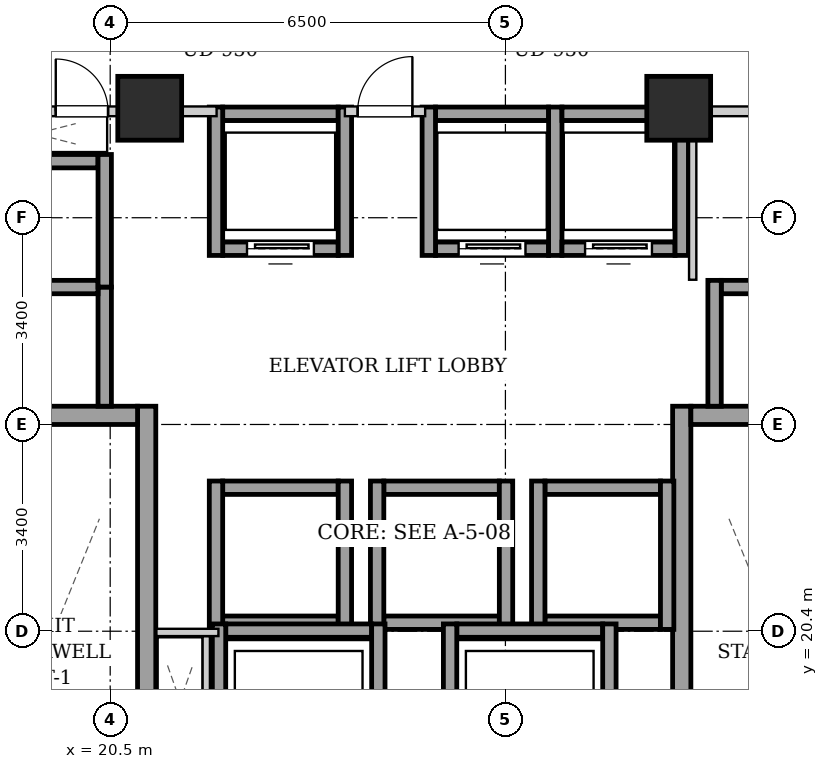
"""IFC4 building model, lengths in metres.
Left out: names, types, materials, properties, quantities, classifications, styles, units other than length and angle.
Written with IfcOpenShell. Run it as: python <this file> out.ifc"""

import sys

from ifc_helpers import new_model, si_unit, direction, frame, frame_2d, origin, origin_2d, place, context, subcontext, project, spatial, rectangle, extrude, element, fill, save


model = new_model("IFC4")
c1 = context("Model", 3, precision=1e-05, world=origin(), true_north=direction((0.0, 1.0)))
c2 = subcontext(c1, "Body", "Model", "MODEL_VIEW")
j1 = project(units=[si_unit("LENGTHUNIT", "METRE"), si_unit("PLANEANGLEUNIT", "RADIAN")], contexts=[c1])
p1 = place(None, origin())
s1 = spatial("IfcSite", under=j1, at=p1, CompositionType="ELEMENT")
p2 = place(p1, origin())
s2 = spatial("IfcBuilding", under=s1, at=p2, CompositionType="ELEMENT")
p3 = place(p2, frame((0.0, 0.0, 103.9)))
s3 = spatial("IfcBuildingStorey", under=s2, at=p3, CompositionType="ELEMENT", Elevation=103.9)
for number, where, z_axis, x_axis in (
    (1, (21.15, 29.0, 0.0), (0.0, 0.0, 1.0), (1.0, 0.0, 0.0)),
    (2, (29.85, 29.0, 0.0), (0.0, 0.0, 1.0), (1.0, 0.0, 0.0)),
):
    element("IfcColumn", number, at=place(p3, frame(where, z_axis=z_axis, x_axis=x_axis)), inside=s3, PredefinedType="COLUMN", context=c2, shape_type="SweptSolid", body=[
        extrude(rectangle(XDim=1.05, YDim=1.05, at=origin_2d()), origin(), (0.0, 0.0, 1.0), 3.2),
    ])
p4 = place(p3, frame((21.1, 15.1, 0.0), z_axis=(0.0, 0.0, 1.0), x_axis=(0.0, 1.0, 0.0)))
e3 = element("IfcWall", 3, at=p4, inside=s3, PredefinedType="SHEAR", context=c2, shape_type="SweptSolid", body=[
    extrude(rectangle(XDim=9.0, YDim=0.3, at=frame_2d((4.5, 0.0))), origin(), (0.0, 0.0, 1.0), 2.94),
])
p5 = place(p3, frame((18.1, 23.95, 0.0), z_axis=(0.0, 0.0, 1.0), x_axis=(1.0, 0.0, 0.0)))
e4 = element("IfcWall", 4, at=p5, inside=s3, PredefinedType="SHEAR", context=c2, shape_type="SweptSolid", body=[
    extrude(rectangle(XDim=2.85, YDim=0.3, at=frame_2d((1.425, 0.0))), origin(), (0.0, 0.0, 1.0), 2.94),
])
p6 = place(p3, frame((29.9, 15.1, 0.0), z_axis=(0.0, 0.0, 1.0), x_axis=(0.0, 1.0, 0.0)))
e5 = element("IfcWall", 5, at=p6, inside=s3, PredefinedType="SHEAR", context=c2, shape_type="SweptSolid", body=[
    extrude(rectangle(XDim=9.0, YDim=0.3, at=frame_2d((4.5, 0.0))), origin(), (0.0, 0.0, 1.0), 2.94),
])
p7 = place(p3, frame((30.05, 23.95, 0.0), z_axis=(0.0, 0.0, 1.0), x_axis=(1.0, 0.0, 0.0)))
e6 = element("IfcWall", 6, at=p7, inside=s3, PredefinedType="SHEAR", context=c2, shape_type="SweptSolid", body=[
    extrude(rectangle(XDim=2.85, YDim=0.3, at=frame_2d((1.425, 0.0))), origin(), (0.0, 0.0, 1.0), 2.94),
])
p8 = place(p3, frame((22.35, 26.69, 0.0), z_axis=(0.0, 0.0, 1.0), x_axis=(1.0, 0.0, 0.0)))
e7 = element("IfcWall", 7, at=p8, inside=s3, PredefinedType="SHEAR", context=c2, shape_type="SweptSolid", body=[
    extrude(rectangle(XDim=1.9, YDim=0.22, at=frame_2d((0.95, 0.0))), origin(), (0.0, 0.0, 1.0), 2.94),
])
p9 = place(p8, frame((0.4, 0.0, 0.0)))
e8 = element("IfcOpeningElement", 8, at=p9, cuts=e7, PredefinedType="OPENING", context=c2, shape_type="SweptSolid", body=[
    extrude(rectangle(XDim=1.1, YDim=2.15, at=frame_2d((0.55, 1.075))), frame((0.0, 0.12, 0.0), z_axis=(0.0, -1.0, 0.0), x_axis=(1.0, 0.0, 0.0)), (0.0, 0.0, 1.0), 0.24),
])
p10 = place(p3, frame((22.35, 28.91, 0.0), z_axis=(0.0, 0.0, 1.0), x_axis=(1.0, 0.0, 0.0)))
e9 = element("IfcWall", 9, at=p10, inside=s3, PredefinedType="SHEAR", context=c2, shape_type="SweptSolid", body=[
    extrude(rectangle(XDim=1.9, YDim=0.22, at=frame_2d((0.95, 0.0))), origin(), (0.0, 0.0, 1.0), 2.94),
])
for number, where, z_axis, x_axis in (
    (10, (22.24, 26.58, 0.0), (0.0, 0.0, 1.0), (0.0, 1.0, 0.0)),
    (11, (24.36, 26.58, 0.0), (0.0, 0.0, 1.0), (0.0, 1.0, 0.0)),
):
    element("IfcWall", number, at=place(p3, frame(where, z_axis=z_axis, x_axis=x_axis)), inside=s3, PredefinedType="SHEAR", context=c2, shape_type="SweptSolid", body=[
        extrude(rectangle(XDim=2.44, YDim=0.22, at=frame_2d((1.22, 0.0))), origin(), (0.0, 0.0, 1.0), 2.94),
    ])
p11 = place(p3, frame((25.85, 26.69, 0.0), z_axis=(0.0, 0.0, 1.0), x_axis=(1.0, 0.0, 0.0)))
e12 = element("IfcWall", 12, at=p11, inside=s3, PredefinedType="SHEAR", context=c2, shape_type="SweptSolid", body=[
    extrude(rectangle(XDim=1.86, YDim=0.22, at=frame_2d((0.93, 0.0))), origin(), (0.0, 0.0, 1.0), 2.94),
])
p12 = place(p11, frame((0.38, 0.0, 0.0)))
e13 = element("IfcOpeningElement", 13, at=p12, cuts=e12, PredefinedType="OPENING", context=c2, shape_type="SweptSolid", body=[
    extrude(rectangle(XDim=1.1, YDim=2.15, at=frame_2d((0.55, 1.075))), frame((0.0, 0.12, 0.0), z_axis=(0.0, -1.0, 0.0), x_axis=(1.0, 0.0, 0.0)), (0.0, 0.0, 1.0), 0.24),
])
p13 = place(p3, frame((25.85, 28.91, 0.0), z_axis=(0.0, 0.0, 1.0), x_axis=(1.0, 0.0, 0.0)))
e14 = element("IfcWall", 14, at=p13, inside=s3, PredefinedType="SHEAR", context=c2, shape_type="SweptSolid", body=[
    extrude(rectangle(XDim=1.86, YDim=0.22, at=frame_2d((0.93, 0.0))), origin(), (0.0, 0.0, 1.0), 2.94),
])
for number, where, z_axis, x_axis in (
    (15, (25.74, 26.58, 0.0), (0.0, 0.0, 1.0), (0.0, 1.0, 0.0)),
    (16, (27.82, 26.58, 0.0), (0.0, 0.0, 1.0), (0.0, 1.0, 0.0)),
):
    element("IfcWall", number, at=place(p3, frame(where, z_axis=z_axis, x_axis=x_axis)), inside=s3, PredefinedType="SHEAR", context=c2, shape_type="SweptSolid", body=[
        extrude(rectangle(XDim=2.44, YDim=0.22, at=frame_2d((1.22, 0.0))), origin(), (0.0, 0.0, 1.0), 2.94),
    ])
p14 = place(p3, frame((27.93, 26.69, 0.0), z_axis=(0.0, 0.0, 1.0), x_axis=(1.0, 0.0, 0.0)))
e17 = element("IfcWall", 17, at=p14, inside=s3, PredefinedType="SHEAR", context=c2, shape_type="SweptSolid", body=[
    extrude(rectangle(XDim=1.86, YDim=0.22, at=frame_2d((0.93, 0.0))), origin(), (0.0, 0.0, 1.0), 2.94),
])
p15 = place(p14, frame((0.38, 0.0, 0.0)))
e18 = element("IfcOpeningElement", 18, at=p15, cuts=e17, PredefinedType="OPENING", context=c2, shape_type="SweptSolid", body=[
    extrude(rectangle(XDim=1.1, YDim=2.15, at=frame_2d((0.55, 1.075))), frame((0.0, 0.12, 0.0), z_axis=(0.0, -1.0, 0.0), x_axis=(1.0, 0.0, 0.0)), (0.0, 0.0, 1.0), 0.24),
])
p16 = place(p3, frame((27.93, 28.91, 0.0), z_axis=(0.0, 0.0, 1.0), x_axis=(1.0, 0.0, 0.0)))
e19 = element("IfcWall", 19, at=p16, inside=s3, PredefinedType="SHEAR", context=c2, shape_type="SweptSolid", body=[
    extrude(rectangle(XDim=1.86, YDim=0.22, at=frame_2d((0.93, 0.0))), origin(), (0.0, 0.0, 1.0), 2.94),
])
p17 = place(p3, frame((29.9, 26.58, 0.0), z_axis=(0.0, 0.0, 1.0), x_axis=(0.0, 1.0, 0.0)))
e20 = element("IfcWall", 20, at=p17, inside=s3, PredefinedType="SHEAR", context=c2, shape_type="SweptSolid", body=[
    extrude(rectangle(XDim=2.44, YDim=0.22, at=frame_2d((1.22, 0.0))), origin(), (0.0, 0.0, 1.0), 2.94),
])
for number, where, z_axis, x_axis in (
    (21, (22.35, 20.54, 0.0), (0.0, 0.0, 1.0), (1.0, 0.0, 0.0)),
    (22, (22.35, 22.76, 0.0), (0.0, 0.0, 1.0), (1.0, 0.0, 0.0)),
):
    element("IfcWall", number, at=place(p3, frame(where, z_axis=z_axis, x_axis=x_axis)), inside=s3, PredefinedType="SHEAR", context=c2, shape_type="SweptSolid", body=[
        extrude(rectangle(XDim=1.9, YDim=0.22, at=frame_2d((0.95, 0.0))), origin(), (0.0, 0.0, 1.0), 2.94),
    ])
for number, where, z_axis, x_axis in (
    (23, (22.24, 20.43, 0.0), (0.0, 0.0, 1.0), (0.0, 1.0, 0.0)),
    (24, (24.36, 20.43, 0.0), (0.0, 0.0, 1.0), (0.0, 1.0, 0.0)),
):
    element("IfcWall", number, at=place(p3, frame(where, z_axis=z_axis, x_axis=x_axis)), inside=s3, PredefinedType="SHEAR", context=c2, shape_type="SweptSolid", body=[
        extrude(rectangle(XDim=2.44, YDim=0.22, at=frame_2d((1.22, 0.0))), origin(), (0.0, 0.0, 1.0), 2.94),
    ])
for number, where, z_axis, x_axis in (
    (25, (25.0, 20.54, 0.0), (0.0, 0.0, 1.0), (1.0, 0.0, 0.0)),
    (26, (25.0, 22.76, 0.0), (0.0, 0.0, 1.0), (1.0, 0.0, 0.0)),
):
    element("IfcWall", number, at=place(p3, frame(where, z_axis=z_axis, x_axis=x_axis)), inside=s3, PredefinedType="SHEAR", context=c2, shape_type="SweptSolid", body=[
        extrude(rectangle(XDim=1.9, YDim=0.22, at=frame_2d((0.95, 0.0))), origin(), (0.0, 0.0, 1.0), 2.94),
    ])
for number, where, z_axis, x_axis in (
    (27, (24.89, 20.43, 0.0), (0.0, 0.0, 1.0), (0.0, 1.0, 0.0)),
    (28, (27.01, 20.43, 0.0), (0.0, 0.0, 1.0), (0.0, 1.0, 0.0)),
):
    element("IfcWall", number, at=place(p3, frame(where, z_axis=z_axis, x_axis=x_axis)), inside=s3, PredefinedType="SHEAR", context=c2, shape_type="SweptSolid", body=[
        extrude(rectangle(XDim=2.44, YDim=0.22, at=frame_2d((1.22, 0.0))), origin(), (0.0, 0.0, 1.0), 2.94),
    ])
for number, where, z_axis, x_axis in (
    (29, (27.65, 20.54, 0.0), (0.0, 0.0, 1.0), (1.0, 0.0, 0.0)),
    (30, (27.65, 22.76, 0.0), (0.0, 0.0, 1.0), (1.0, 0.0, 0.0)),
):
    element("IfcWall", number, at=place(p3, frame(where, z_axis=z_axis, x_axis=x_axis)), inside=s3, PredefinedType="SHEAR", context=c2, shape_type="SweptSolid", body=[
        extrude(rectangle(XDim=1.9, YDim=0.22, at=frame_2d((0.95, 0.0))), origin(), (0.0, 0.0, 1.0), 2.94),
    ])
for number, where, z_axis, x_axis in (
    (31, (27.54, 20.43, 0.0), (0.0, 0.0, 1.0), (0.0, 1.0, 0.0)),
    (32, (29.66, 20.43, 0.0), (0.0, 0.0, 1.0), (0.0, 1.0, 0.0)),
):
    element("IfcWall", number, at=place(p3, frame(where, z_axis=z_axis, x_axis=x_axis)), inside=s3, PredefinedType="SHEAR", context=c2, shape_type="SweptSolid", body=[
        extrude(rectangle(XDim=2.44, YDim=0.22, at=frame_2d((1.22, 0.0))), origin(), (0.0, 0.0, 1.0), 2.94),
    ])
p18 = place(p3, frame((20.41, 24.1, 0.0), z_axis=(0.0, 0.0, 1.0), x_axis=(0.0, 1.0, 0.0)))
e33 = element("IfcWall", 33, at=p18, inside=s3, PredefinedType="SHEAR", context=c2, shape_type="SweptSolid", body=[
    extrude(rectangle(XDim=1.96, YDim=0.22, at=frame_2d((0.98, 0.0))), origin(), (0.0, 0.0, 1.0), 2.94),
])
for number, where, z_axis, x_axis in (
    (34, (18.4, 26.06, 0.0), (0.0, 0.0, 1.0), (1.0, 0.0, 0.0)),
    (35, (18.4, 28.13, 0.0), (0.0, 0.0, 1.0), (1.0, 0.0, 0.0)),
):
    element("IfcWall", number, at=place(p3, frame(where, z_axis=z_axis, x_axis=x_axis)), inside=s3, PredefinedType="SHEAR", context=c2, shape_type="SweptSolid", body=[
        extrude(rectangle(XDim=1.9, YDim=0.22, at=frame_2d((0.95, 0.0))), origin(), (0.0, 0.0, 1.0), 2.94),
    ])
p19 = place(p3, frame((20.41, 26.06, 0.0), z_axis=(0.0, 0.0, 1.0), x_axis=(0.0, 1.0, 0.0)))
e36 = element("IfcWall", 36, at=p19, inside=s3, PredefinedType="SHEAR", context=c2, shape_type="SweptSolid", body=[
    extrude(rectangle(XDim=2.18, YDim=0.22, at=frame_2d((1.09, 0.0))), origin(), (0.0, 0.0, 1.0), 2.94),
])
p20 = place(p3, frame((30.55, 26.06, 0.0), z_axis=(0.0, 0.0, 1.0), x_axis=(1.0, 0.0, 0.0)))
e37 = element("IfcWall", 37, at=p20, inside=s3, PredefinedType="SHEAR", context=c2, shape_type="SweptSolid", body=[
    extrude(rectangle(XDim=1.9, YDim=0.22, at=frame_2d((0.95, 0.0))), origin(), (0.0, 0.0, 1.0), 2.94),
])
p21 = place(p3, frame((30.44, 24.1, 0.0), z_axis=(0.0, 0.0, 1.0), x_axis=(0.0, 1.0, 0.0)))
e38 = element("IfcWall", 38, at=p21, inside=s3, PredefinedType="SHEAR", context=c2, shape_type="SweptSolid", body=[
    extrude(rectangle(XDim=2.07, YDim=0.22, at=frame_2d((1.035, 0.0))), origin(), (0.0, 0.0, 1.0), 2.94),
])
p22 = place(p3, frame((22.4, 20.41, 0.0), z_axis=(0.0, 0.0, 1.0), x_axis=(1.0, 0.0, 0.0)))
e39 = element("IfcWall", 39, at=p22, inside=s3, PredefinedType="SHEAR", context=c2, shape_type="SweptSolid", body=[
    extrude(rectangle(XDim=2.4, YDim=0.22, at=frame_2d((1.2, 0.0))), origin(), (0.0, 0.0, 1.0), 2.94),
])
for number, where, z_axis, x_axis in (
    (40, (22.29, 17.98, 0.0), (0.0, 0.0, 1.0), (0.0, 1.0, 0.0)),
    (41, (24.91, 17.98, 0.0), (0.0, 0.0, 1.0), (0.0, 1.0, 0.0)),
):
    element("IfcWall", number, at=place(p3, frame(where, z_axis=z_axis, x_axis=x_axis)), inside=s3, PredefinedType="SHEAR", context=c2, shape_type="SweptSolid", body=[
        extrude(rectangle(XDim=2.54, YDim=0.22, at=frame_2d((1.27, 0.0))), origin(), (0.0, 0.0, 1.0), 2.94),
    ])
p23 = place(p3, frame((26.2, 20.41, 0.0), z_axis=(0.0, 0.0, 1.0), x_axis=(1.0, 0.0, 0.0)))
e42 = element("IfcWall", 42, at=p23, inside=s3, PredefinedType="SHEAR", context=c2, shape_type="SweptSolid", body=[
    extrude(rectangle(XDim=2.4, YDim=0.22, at=frame_2d((1.2, 0.0))), origin(), (0.0, 0.0, 1.0), 2.94),
])
for number, where, z_axis, x_axis in (
    (43, (26.09, 17.98, 0.0), (0.0, 0.0, 1.0), (0.0, 1.0, 0.0)),
    (44, (28.71, 17.98, 0.0), (0.0, 0.0, 1.0), (0.0, 1.0, 0.0)),
):
    element("IfcWall", number, at=place(p3, frame(where, z_axis=z_axis, x_axis=x_axis)), inside=s3, PredefinedType="SHEAR", context=c2, shape_type="SweptSolid", body=[
        extrude(rectangle(XDim=2.54, YDim=0.22, at=frame_2d((1.27, 0.0))), origin(), (0.0, 0.0, 1.0), 2.94),
    ])
p24 = place(p3, frame((24.36, 28.95, 0.0), z_axis=(0.0, 0.0, 1.0), x_axis=(1.0, 0.0, 0.0)))
e45 = element("IfcWall", 45, at=p24, inside=s3, PredefinedType="PARTITIONING", context=c2, shape_type="SweptSolid", body=[
    extrude(rectangle(XDim=1.32, YDim=0.16, at=frame_2d((0.66, 0.0))), origin(), (0.0, 0.0, 1.0), 2.313),
])
p25 = place(p24, frame((0.21, 0.0, 0.0)))
e46 = element("IfcOpeningElement", 46, at=p25, cuts=e45, PredefinedType="OPENING", context=c2, shape_type="SweptSolid", body=[
    extrude(rectangle(XDim=0.9, YDim=2.05, at=frame_2d((0.45, 1.025))), frame((0.0, 0.09, 0.0), z_axis=(0.0, -1.0, 0.0), x_axis=(1.0, 0.0, 0.0)), (0.0, 0.0, 1.0), 0.18),
])
p26 = place(p3, frame((17.96, 28.95, 0.0), z_axis=(0.0, 0.0, 1.0), x_axis=(1.0, 0.0, 0.0)))
e47 = element("IfcWall", 47, at=p26, inside=s3, PredefinedType="PARTITIONING", context=c2, shape_type="SweptSolid", body=[
    extrude(rectangle(XDim=4.29, YDim=0.16, at=frame_2d((2.145, 0.0))), origin(), (0.0, 0.0, 1.0), 2.313),
])
p27 = place(p26, frame((1.645, 0.0, 0.0)))
e48 = element("IfcOpeningElement", 48, at=p27, cuts=e47, PredefinedType="OPENING", context=c2, shape_type="SweptSolid", body=[
    extrude(rectangle(XDim=0.86, YDim=2.05, at=frame_2d((0.43, 1.025))), frame((0.0, 0.09, 0.0), z_axis=(0.0, -1.0, 0.0), x_axis=(1.0, 0.0, 0.0)), (0.0, 0.0, 1.0), 0.18),
])
p28 = place(p3, frame((22.08, 18.2, 0.0), z_axis=(0.0, 0.0, 1.0), x_axis=(0.0, 1.0, 0.0)))
e49 = element("IfcWall", 49, at=p28, inside=s3, PredefinedType="PARTITIONING", context=c2, shape_type="SweptSolid", body=[
    extrude(rectangle(XDim=2.12, YDim=0.12, at=frame_2d((1.06, 0.0))), origin(), (0.0, 0.0, 1.0), 2.94),
])
p29 = place(p3, frame((22.28, 20.38, 0.0), z_axis=(0.0, 0.0, 1.0), x_axis=(-1.0, 0.0, 0.0)))
e50 = element("IfcWall", 50, at=p29, inside=s3, PredefinedType="PARTITIONING", context=c2, shape_type="SweptSolid", body=[
    extrude(rectangle(XDim=1.02, YDim=0.12, at=frame_2d((0.51, 0.0))), origin(), (0.0, 0.0, 1.0), 2.94),
])
p30 = place(p3, frame((30.08, 26.18, 0.0), z_axis=(0.0, 0.0, 1.0), x_axis=(0.0, 1.0, 0.0)))
e51 = element("IfcWall", 51, at=p30, inside=s3, PredefinedType="PARTITIONING", context=c2, shape_type="SweptSolid", body=[
    extrude(rectangle(XDim=2.68, YDim=0.12, at=frame_2d((1.34, 0.0))), origin(), (0.0, 0.0, 1.0), 2.94),
])
p31 = place(p3, frame((30.08, 28.95, 0.0), z_axis=(0.0, 0.0, 1.0), x_axis=(1.0, 0.0, 0.0)))
e52 = element("IfcWall", 52, at=p31, inside=s3, PredefinedType="PARTITIONING", context=c2, shape_type="SweptSolid", body=[
    extrude(rectangle(XDim=2.96, YDim=0.16, at=frame_2d((1.48, 0.0))), origin(), (0.0, 0.0, 1.0), 2.94),
])
p32 = place(p31, frame((1.045, 0.0, 0.0)))
e53 = element("IfcOpeningElement", 53, at=p32, cuts=e52, PredefinedType="OPENING", context=c2, shape_type="SweptSolid", body=[
    extrude(rectangle(XDim=0.86, YDim=2.05, at=frame_2d((0.43, 1.025))), frame((0.0, 0.09, 0.0), z_axis=(0.0, -1.0, 0.0), x_axis=(1.0, 0.0, 0.0)), (0.0, 0.0, 1.0), 0.18),
])
p33 = place(p9, origin())
e54 = element("IfcDoor", 54, at=p33, inside=s3, OperationType="SLIDING_TO_LEFT", PredefinedType="DOOR", context=c2, shape_type="SweptSolid", body=[
    extrude(rectangle(XDim=1.1, YDim=2.15, at=frame_2d((0.55, 1.075))), frame((0.0, 0.025, 0.0), z_axis=(0.0, -1.0, 0.0), x_axis=(1.0, 0.0, 0.0)), (0.0, 0.0, 1.0), 0.05),
])
fill(e8, e54)
p34 = place(p12, origin())
e55 = element("IfcDoor", 55, at=p34, inside=s3, OperationType="SLIDING_TO_LEFT", PredefinedType="DOOR", context=c2, shape_type="SweptSolid", body=[
    extrude(rectangle(XDim=1.1, YDim=2.15, at=frame_2d((0.55, 1.075))), frame((0.0, 0.025, 0.0), z_axis=(0.0, -1.0, 0.0), x_axis=(1.0, 0.0, 0.0)), (0.0, 0.0, 1.0), 0.05),
])
fill(e13, e55)
p35 = place(p15, origin())
e56 = element("IfcDoor", 56, at=p35, inside=s3, OperationType="SLIDING_TO_LEFT", PredefinedType="DOOR", context=c2, shape_type="SweptSolid", body=[
    extrude(rectangle(XDim=1.1, YDim=2.15, at=frame_2d((0.55, 1.075))), frame((0.0, 0.025, 0.0), z_axis=(0.0, -1.0, 0.0), x_axis=(1.0, 0.0, 0.0)), (0.0, 0.0, 1.0), 0.05),
])
fill(e18, e56)
p36 = place(p25, origin())
e57 = element("IfcDoor", 57, at=p36, inside=s3, OperationType="SINGLE_SWING_RIGHT", PredefinedType="DOOR", context=c2, shape_type="SweptSolid", body=[
    extrude(rectangle(XDim=0.9, YDim=2.05, at=frame_2d((0.45, 1.025))), frame((0.0, 0.025, 0.0), z_axis=(0.0, -1.0, 0.0), x_axis=(1.0, 0.0, 0.0)), (0.0, 0.0, 1.0), 0.05),
])
fill(e46, e57)
p37 = place(p27, origin())
e58 = element("IfcDoor", 58, at=p37, inside=s3, OperationType="SINGLE_SWING_LEFT", PredefinedType="DOOR", context=c2, shape_type="SweptSolid", body=[
    extrude(rectangle(XDim=0.86, YDim=2.05, at=frame_2d((0.43, 1.025))), frame((0.0, 0.025, 0.0), z_axis=(0.0, -1.0, 0.0), x_axis=(1.0, 0.0, 0.0)), (0.0, 0.0, 1.0), 0.05),
])
fill(e48, e58)
save(model, sys.argv[1])
